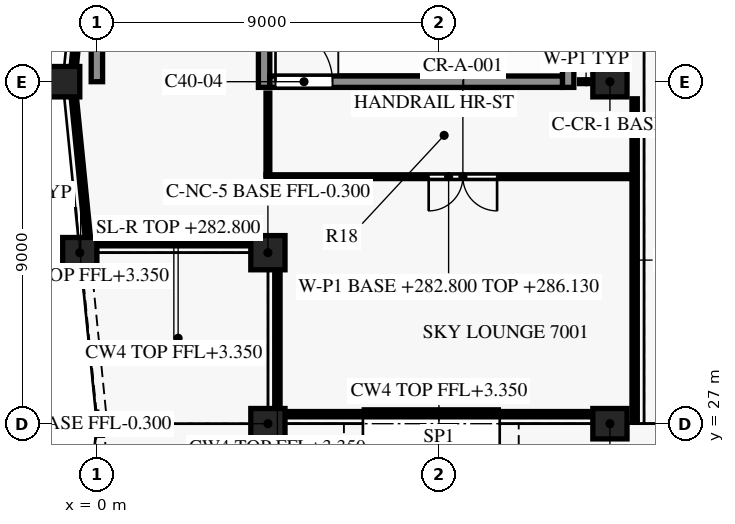
"""IFC4 building model, lengths in metres.
Left out: names, types, materials, properties, quantities, classifications, styles, units other than length and angle.
Written with IfcOpenShell. Run it as: python <this file> out.ifc"""

import sys

from ifc_helpers import new_model, si_unit, direction, frame, frame_2d, origin, origin_2d, place, context, subcontext, project, spatial, polyline, rectangle, outline, extrude, element, fill, save


model = new_model("IFC4")
c1 = context("Model", 3, precision=1e-05, world=origin(), true_north=direction((0.0, 1.0)))
c2 = subcontext(c1, "Body", "Model", "MODEL_VIEW")
j1 = project(units=[si_unit("LENGTHUNIT", "METRE"), si_unit("PLANEANGLEUNIT", "RADIAN")], contexts=[c1])
p1 = place(None, origin())
s1 = spatial("IfcSite", under=j1, at=p1, CompositionType="ELEMENT")
p2 = place(p1, origin())
s2 = spatial("IfcBuilding", under=s1, at=p2, CompositionType="ELEMENT")
p3 = place(p2, frame((0.0, 0.0, 282.8)))
s3 = spatial("IfcBuildingStorey", under=s2, at=p3, CompositionType="ELEMENT", Elevation=282.8)
for number, where, z_axis, x_axis in (
    (1, (4.5, 27.0, -0.3), (0.0, 0.0, 1.0), (1.0, 0.0, 0.0)),
    (2, (13.5, 27.0, -0.3), (0.0, 0.0, 1.0), (1.0, 0.0, 0.0)),
    (3, (13.5, 36.0, -0.3), (0.0, 0.0, 1.0), (1.0, 0.0, 0.0)),
):
    element("IfcColumn", number, at=place(p3, frame(where, z_axis=z_axis, x_axis=x_axis)), inside=s3, PredefinedType="COLUMN", context=c2, shape_type="SweptSolid", body=[
        extrude(rectangle(XDim=0.9, YDim=0.8, at=origin_2d()), origin(), (0.0, 0.0, 1.0), 4.3),
    ])
for number, where, z_axis, x_axis in (
    (4, (-0.9, 36.0, 0.0), (0.0, 0.0, 1.0), (0.0, -1.0, 0.0)),
    (5, (-0.45, 31.5, 0.0), (0.0, 0.0, 1.0), (0.1, -0.995, 0.0)),
):
    element("IfcColumn", number, at=place(p3, frame(where, z_axis=z_axis, x_axis=x_axis)), inside=s3, PredefinedType="COLUMN", context=c2, shape_type="SweptSolid", body=[
        extrude(rectangle(XDim=0.9, YDim=0.8, at=origin_2d()), origin(), (0.0, 0.0, 1.0), 4.0),
    ])
p4 = place(p3, frame((4.5, 31.5, -0.3), z_axis=(0.0, 0.0, 1.0), x_axis=(1.0, 0.0, 0.0)))
e6 = element("IfcColumn", 6, at=p4, inside=s3, PredefinedType="COLUMN", context=c2, shape_type="SweptSolid", body=[
    extrude(rectangle(XDim=0.9, YDim=0.9, at=origin_2d()), origin(), (0.0, 0.0, 1.0), 4.3),
])
p5 = place(p3, origin())
e7 = element("IfcWall", 7, at=p5, inside=s3, PredefinedType="PARAPET", context=c2, shape_type="SweptSolid", body=[
    extrude(outline(polyline([(4.52, 18.02), (31.48, 18.02), (31.48, 22.52), (35.65, 22.52), (35.65, 22.77), (31.23, 22.77), (31.23, 18.27), (4.77, 18.27), (4.77, 22.77), (-0.152, 22.77), (0.236, 26.65), (-0.015, 26.65), (-0.428, 22.52), (4.52, 22.52), (4.52, 18.02)])), origin(), (0.0, 0.0, 1.0), 1.4),
])
p6 = place(p3, origin())
e8 = element("IfcWall", 8, at=p6, inside=s3, PredefinedType="PARAPET", context=c2, shape_type="SweptSolid", body=[
    extrude(outline(polyline([(6.75, 19.15), (10.75, 19.15), (10.75, 19.35), (6.95, 19.35), (6.95, 26.95), (6.75, 26.95), (6.75, 19.15)])), origin(), (0.0, 0.0, 1.0), 1.1),
])
p7 = place(p3, origin())
e9 = element("IfcWall", 9, at=p7, inside=s3, PredefinedType="PARAPET", context=c2, shape_type="SweptSolid", body=[
    extrude(outline(polyline([(10.85, 19.25), (10.85, 26.95), (10.65, 26.95), (10.65, 19.25), (10.85, 19.25)])), origin(), (0.0, 0.0, 1.0), 1.1),
])
p8 = place(p3, origin())
e10 = element("IfcWall", 10, at=p8, inside=s3, PredefinedType="PARAPET", context=c2, shape_type="SweptSolid", body=[
    extrude(outline(polyline([(-0.395, 31.15), (-0.015, 27.35), (0.236, 27.35), (-0.144, 31.15), (-0.395, 31.15)])), origin(), (0.0, 0.0, 1.0), 1.4),
])
p9 = place(p3, frame((4.55, 36.0, 0.0), z_axis=(0.0, 0.0, 1.0), x_axis=(1.0, 0.0, 0.0)))
e11 = element("IfcWall", 11, at=p9, inside=s3, PredefinedType="SHEAR", context=c2, shape_type="SweptSolid", body=[
    extrude(rectangle(XDim=7.7, YDim=0.3, at=frame_2d((3.85, 0.0))), origin(), (0.0, 0.0, 1.0), 3.7),
])
p10 = place(p9, frame((0.15, 0.0, 0.0)))
e12 = element("IfcOpeningElement", 12, at=p10, cuts=e11, PredefinedType="OPENING", context=c2, shape_type="SweptSolid", body=[
    extrude(rectangle(XDim=1.5, YDim=2.2, at=frame_2d((0.75, 1.1))), frame((0.0, 0.16, 0.0), z_axis=(0.0, -1.0, 0.0), x_axis=(1.0, 0.0, 0.0)), (0.0, 0.0, 1.0), 0.32),
])
p11 = place(p3, frame((0.0, 36.0, 0.0), z_axis=(0.0, 0.0, 1.0), x_axis=(0.0, 1.0, 0.0)))
e13 = element("IfcWall", 13, at=p11, inside=s3, PredefinedType="SHEAR", context=c2, shape_type="SweptSolid", body=[
    extrude(rectangle(XDim=7.275, YDim=0.3, at=frame_2d((3.637, 0.0))), origin(), (0.0, 0.0, 1.0), 3.7),
])
p12 = place(p3, frame((4.4, 35.85, 0.0), z_axis=(0.0, 0.0, 1.0), x_axis=(0.0, 1.0, 0.0)))
e14 = element("IfcWall", 14, at=p12, inside=s3, PredefinedType="SHEAR", context=c2, shape_type="SweptSolid", body=[
    extrude(rectangle(XDim=3.75, YDim=0.3, at=frame_2d((1.875, 0.0))), origin(), (0.0, 0.0, 1.0), 3.7),
])
p13 = place(p3, frame((12.4, 35.85, 0.0), z_axis=(0.0, 0.0, 1.0), x_axis=(0.0, 1.0, 0.0)))
e15 = element("IfcWall", 15, at=p13, inside=s3, PredefinedType="SHEAR", context=c2, shape_type="SweptSolid", body=[
    extrude(rectangle(XDim=3.9, YDim=0.3, at=frame_2d((1.95, 0.0))), origin(), (0.0, 0.0, 1.0), 3.7),
])
p14 = place(p3, frame((14.06, 33.5, 0.0), z_axis=(0.0, 0.0, 1.0), x_axis=(-1.0, 0.0, 0.0)))
e16 = element("IfcWall", 16, at=p14, inside=s3, PredefinedType="PARTITIONING", context=c2, shape_type="SweptSolid", body=[
    extrude(rectangle(XDim=9.61, YDim=0.1, at=frame_2d((4.805, 0.0))), origin(), (0.0, 0.0, 1.0), 3.33),
])
p15 = place(p14, frame((3.53, 0.0, 0.0)))
e17 = element("IfcOpeningElement", 17, at=p15, cuts=e16, PredefinedType="OPENING", context=c2, shape_type="SweptSolid", body=[
    extrude(rectangle(XDim=1.8, YDim=2.1, at=frame_2d((0.9, 1.05))), frame((0.0, 0.06, 0.0), z_axis=(0.0, -1.0, 0.0), x_axis=(1.0, 0.0, 0.0)), (0.0, 0.0, 1.0), 0.12),
])
p16 = place(p3, frame((4.5, 33.55, 0.0), z_axis=(0.0, 0.0, 1.0), x_axis=(0.0, 1.0, 0.0)))
e18 = element("IfcWall", 18, at=p16, inside=s3, PredefinedType="PARTITIONING", context=c2, shape_type="SweptSolid", body=[
    extrude(rectangle(XDim=2.15, YDim=0.1, at=frame_2d((1.075, 0.0))), origin(), (0.0, 0.0, 1.0), 3.68),
])
p17 = place(p3, frame((12.7, 36.0, 0.0), z_axis=(0.0, 0.0, 1.0), x_axis=(1.0, 0.0, 0.0)))
e19 = element("IfcWall", 19, at=p17, inside=s3, PredefinedType="PARTITIONING", context=c2, shape_type="SweptSolid", body=[
    extrude(rectangle(XDim=0.345, YDim=0.1, at=frame_2d((0.172, 0.0))), origin(), (0.0, 0.0, 1.0), 3.68),
])
p18 = place(p10, origin())
e20 = element("IfcDoor", 20, at=p18, inside=s3, OperationType="SINGLE_SWING_RIGHT", PredefinedType="DOOR", context=c2, shape_type="SweptSolid", body=[
    extrude(rectangle(XDim=1.5, YDim=2.2, at=frame_2d((0.75, 1.1))), frame((0.0, 0.025, 0.0), z_axis=(0.0, -1.0, 0.0), x_axis=(1.0, 0.0, 0.0)), (0.0, 0.0, 1.0), 0.05),
])
fill(e12, e20)
p19 = place(p15, origin())
e21 = element("IfcDoor", 21, at=p19, inside=s3, OperationType="DOUBLE_DOOR_SINGLE_SWING", PredefinedType="DOOR", context=c2, shape_type="SweptSolid", body=[
    extrude(rectangle(XDim=1.8, YDim=2.1, at=frame_2d((0.9, 1.05))), frame((0.0, 0.025, 0.0), z_axis=(0.0, -1.0, 0.0), x_axis=(1.0, 0.0, 0.0)), (0.0, 0.0, 1.0), 0.05),
])
fill(e17, e21)
save(model, sys.argv[1])
